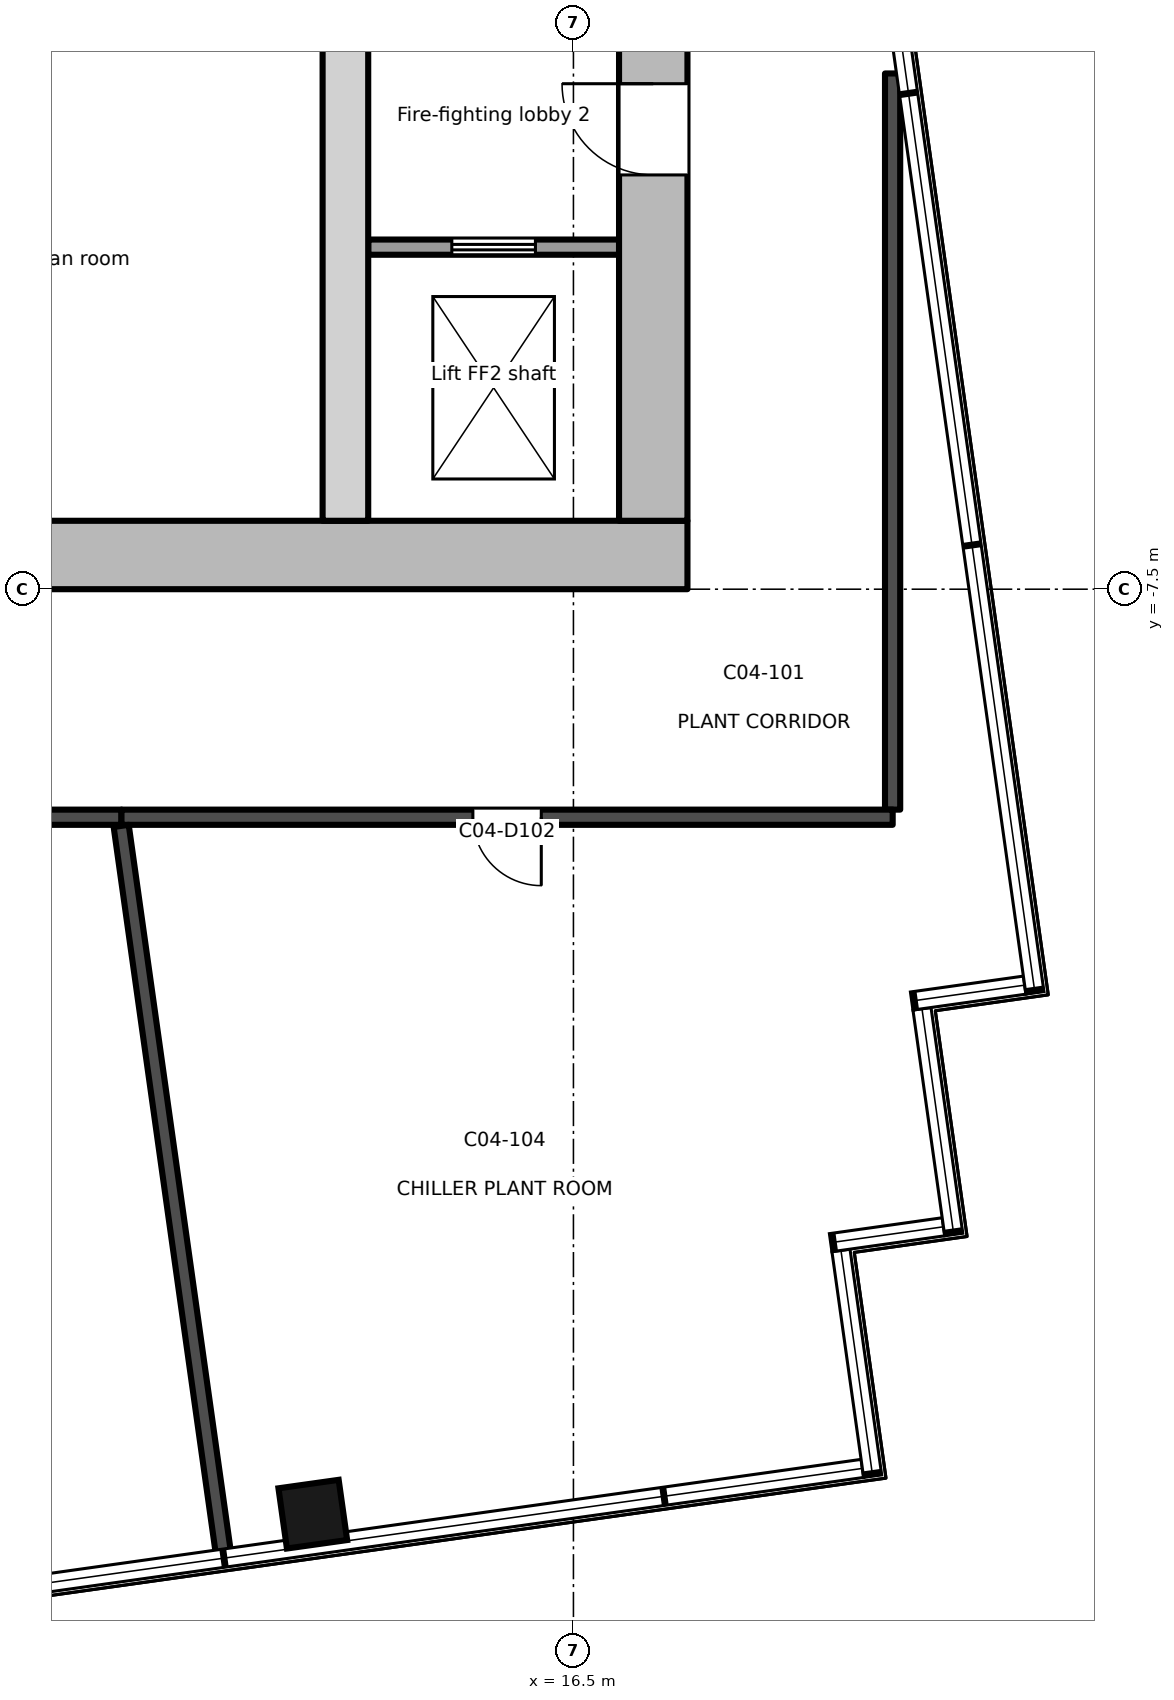
"""IFC4 building model, lengths in metres.
Left out: names, types, materials, properties, quantities, classifications, styles, units other than length and angle.
Written with IfcOpenShell. Run it as: python <this file> out.ifc"""

import sys

from ifc_helpers import new_model, si_unit, direction, frame, frame_2d, origin, origin_2d, place, context, subcontext, project, spatial, rectangle, extrude, element, fill, save


model = new_model("IFC4")
c1 = context("Model", 3, precision=1e-05, world=origin(), true_north=direction((0.0, 1.0)))
c2 = subcontext(c1, "Body", "Model", "MODEL_VIEW")
j1 = project(units=[si_unit("LENGTHUNIT", "METRE"), si_unit("PLANEANGLEUNIT", "RADIAN")], contexts=[c1])
p1 = place(None, origin())
s1 = spatial("IfcSite", under=j1, at=p1, CompositionType="ELEMENT")
p2 = place(p1, origin())
s2 = spatial("IfcBuilding", under=s1, at=p2, CompositionType="ELEMENT")
p3 = place(p2, frame((0.0, 0.0, 304.3)))
s3 = spatial("IfcBuildingStorey", under=s2, at=p3, CompositionType="ELEMENT", Elevation=304.3)
p4 = place(p3, frame((13.071, -19.669, -0.2), z_axis=(0.0, 0.0, 1.0), x_axis=(0.990265639562, 0.139190384377, 0.0)))
e1 = element("IfcColumn", 1, at=p4, inside=s3, PredefinedType="COLUMN", context=c2, shape_type="SweptSolid", body=[
    extrude(rectangle(XDim=0.8, YDim=0.8, at=origin_2d()), origin(), (0.0, 0.0, 1.0), 4.0),
])
p5 = place(p3, frame((-18.0, -7.05, -0.2), z_axis=(0.0, 0.0, 1.0), x_axis=(1.0, 0.0, 0.0)))
e2 = element("IfcWall", 2, at=p5, inside=s3, PredefinedType="SHEAR", context=c2, shape_type="SweptSolid", body=[
    extrude(rectangle(XDim=36.0, YDim=0.9, at=frame_2d((18.0, 0.0))), origin(), (0.0, 0.0, 1.0), 4.0),
])
p6 = place(p5, frame((4.9, 0.0, 0.2)))
e3 = element("IfcOpeningElement", 3, at=p6, cuts=e2, PredefinedType="OPENING", context=c2, shape_type="SweptSolid", body=[
    extrude(rectangle(XDim=1.8, YDim=2.1, at=frame_2d((0.9, 1.05))), frame((0.0, 0.46, 0.0), z_axis=(0.0, -1.0, 0.0), x_axis=(1.0, 0.0, 0.0)), (0.0, 0.0, 1.0), 0.921),
])
p7 = place(p5, frame((13.9, 0.0, 0.2)))
e4 = element("IfcOpeningElement", 4, at=p7, cuts=e2, PredefinedType="OPENING", context=c2, shape_type="SweptSolid", body=[
    extrude(rectangle(XDim=1.8, YDim=2.1, at=frame_2d((0.9, 1.05))), frame((0.0, 0.46, 0.0), z_axis=(0.0, -1.0, 0.0), x_axis=(1.0, 0.0, 0.0)), (0.0, 0.0, 1.0), 0.921),
])
p8 = place(p5, frame((22.9, 0.0, 0.2)))
e5 = element("IfcOpeningElement", 5, at=p8, cuts=e2, PredefinedType="OPENING", context=c2, shape_type="SweptSolid", body=[
    extrude(rectangle(XDim=1.8, YDim=2.1, at=frame_2d((0.9, 1.05))), frame((0.0, 0.46, 0.0), z_axis=(0.0, -1.0, 0.0), x_axis=(1.0, 0.0, 0.0)), (0.0, 0.0, 1.0), 0.921),
])
p9 = place(p3, frame((17.55, -6.6, -0.2), z_axis=(0.0, 0.0, 1.0), x_axis=(0.0, 1.0, 0.0)))
e6 = element("IfcWall", 6, at=p9, inside=s3, PredefinedType="SHEAR", context=c2, shape_type="SweptSolid", body=[
    extrude(rectangle(XDim=13.2, YDim=0.9, at=frame_2d((6.6, 0.0))), origin(), (0.0, 0.0, 1.0), 4.0),
])
p10 = place(p9, frame((4.55, 0.0, 0.2)))
e7 = element("IfcOpeningElement", 7, at=p10, cuts=e6, PredefinedType="OPENING", context=c2, shape_type="SweptSolid", body=[
    extrude(rectangle(XDim=1.2, YDim=2.1, at=frame_2d((0.6, 1.05))), frame((0.0, 0.46, 0.0), z_axis=(0.0, -1.0, 0.0), x_axis=(1.0, 0.0, 0.0)), (0.0, 0.0, 1.0), 0.921),
])
p11 = place(p3, frame((13.5, -6.6, -0.2), z_axis=(0.0, 0.0, 1.0), x_axis=(0.0, 1.0, 0.0)))
e8 = element("IfcWall", 8, at=p11, inside=s3, PredefinedType="SHEAR", context=c2, shape_type="SweptSolid", body=[
    extrude(rectangle(XDim=13.2, YDim=0.6, at=frame_2d((6.6, 0.0))), origin(), (0.0, 0.0, 1.0), 4.0),
])
p12 = place(p3, frame((13.8, -3.0, 0.0), z_axis=(0.0, 0.0, 1.0), x_axis=(1.0, 0.0, 0.0)))
e9 = element("IfcWall", 9, at=p12, inside=s3, PredefinedType="PARTITIONING", context=c2, shape_type="SweptSolid", body=[
    extrude(rectangle(XDim=3.3, YDim=0.2, at=frame_2d((1.65, 0.0))), origin(), (0.0, 0.0, 1.0), 3.8),
])
p13 = place(p12, frame((1.1, 0.0, 0.0)))
e10 = element("IfcOpeningElement", 10, at=p13, cuts=e9, PredefinedType="OPENING", context=c2, shape_type="SweptSolid", body=[
    extrude(rectangle(XDim=1.1, YDim=2.1, at=frame_2d((0.55, 1.05))), frame((0.0, 0.111, 0.0), z_axis=(0.0, -1.0, 0.0), x_axis=(1.0, 0.0, 0.0)), (0.0, 0.0, 1.0), 0.221),
])
p14 = place(p3, frame((10.554, -10.5, 0.0), z_axis=(0.0, 0.0, 1.0), x_axis=(-1.0, 0.0, 0.0)))
e11 = element("IfcWall", 11, at=p14, inside=s3, PredefinedType="PARTITIONING", context=c2, shape_type="SweptSolid", body=[
    extrude(rectangle(XDim=20.703, YDim=0.2, at=frame_2d((10.352, 0.0))), origin(), (0.0, 0.0, 1.0), 3.1),
])
p15 = place(p14, frame((9.902, 0.0, 0.0)))
e12 = element("IfcOpeningElement", 12, at=p15, cuts=e11, PredefinedType="OPENING", context=c2, shape_type="SweptSolid", body=[
    extrude(rectangle(XDim=0.9, YDim=2.1, at=frame_2d((0.45, 1.05))), frame((0.0, 0.111, 0.0), z_axis=(0.0, -1.0, 0.0), x_axis=(1.0, 0.0, 0.0)), (0.0, 0.0, 1.0), 0.221),
])
p16 = place(p3, frame((20.699, -0.715, 0.0), z_axis=(0.0, 0.0, 1.0), x_axis=(0.0, -1.0, 0.0)))
e13 = element("IfcWall", 13, at=p16, inside=s3, PredefinedType="PARTITIONING", context=c2, shape_type="SweptSolid", body=[
    extrude(rectangle(XDim=9.685, YDim=0.2, at=frame_2d((4.842, 0.0))), origin(), (0.0, 0.0, 1.0), 3.8),
])
p17 = place(p3, frame((20.7, -10.5, 0.0), z_axis=(0.0, 0.0, 1.0), x_axis=(-1.0, 0.0, 0.0)))
e14 = element("IfcWall", 14, at=p17, inside=s3, PredefinedType="PARTITIONING", context=c2, shape_type="SweptSolid", body=[
    extrude(rectangle(XDim=10.146, YDim=0.2, at=frame_2d((5.073, 0.0))), origin(), (0.0, 0.0, 1.0), 3.2),
])
p18 = place(p17, frame((4.623, 0.0, 0.0)))
e15 = element("IfcOpeningElement", 15, at=p18, cuts=e14, PredefinedType="OPENING", context=c2, shape_type="SweptSolid", body=[
    extrude(rectangle(XDim=0.9, YDim=2.1, at=frame_2d((0.45, 1.05))), frame((0.0, 0.111, 0.0), z_axis=(0.0, -1.0, 0.0), x_axis=(1.0, 0.0, 0.0)), (0.0, 0.0, 1.0), 0.221),
])
p19 = place(p3, frame((10.55, -10.614, 0.0), z_axis=(0.0, 0.0, 1.0), x_axis=(0.139161669219, -0.990269675301, 0.0)))
e16 = element("IfcWall", 16, at=p19, inside=s3, PredefinedType="PARTITIONING", context=c2, shape_type="SweptSolid", body=[
    extrude(rectangle(XDim=9.637, YDim=0.2, at=frame_2d((4.818, 0.0))), origin(), (0.0, 0.0, 1.0), 3.8),
])
p20 = place(p13, origin())
e17 = element("IfcDoor", 17, at=p20, inside=s3, OperationType="DOUBLE_DOOR_SLIDING", PredefinedType="DOOR", context=c2, shape_type="SweptSolid", body=[
    extrude(rectangle(XDim=1.1, YDim=2.1, at=frame_2d((0.55, 1.05))), frame((0.0, 0.025, 0.0), z_axis=(0.0, -1.0, 0.0), x_axis=(1.0, 0.0, 0.0)), (0.0, 0.0, 1.0), 0.05),
])
fill(e10, e17)
p21 = place(p10, origin())
e18 = element("IfcDoor", 18, at=p21, inside=s3, OperationType="SINGLE_SWING_RIGHT", PredefinedType="DOOR", context=c2, shape_type="SweptSolid", body=[
    extrude(rectangle(XDim=1.2, YDim=2.1, at=frame_2d((0.6, 1.05))), frame((0.0, 0.025, 0.0), z_axis=(0.0, -1.0, 0.0), x_axis=(1.0, 0.0, 0.0)), (0.0, 0.0, 1.0), 0.05),
])
fill(e7, e18)
p22 = place(p18, origin())
e19 = element("IfcDoor", 19, at=p22, inside=s3, OperationType="SINGLE_SWING_LEFT", PredefinedType="DOOR", context=c2, shape_type="SweptSolid", body=[
    extrude(rectangle(XDim=0.9, YDim=2.1, at=frame_2d((0.45, 1.05))), frame((0.0, 0.025, 0.0), z_axis=(0.0, -1.0, 0.0), x_axis=(1.0, 0.0, 0.0)), (0.0, 0.0, 1.0), 0.05),
])
fill(e15, e19)
save(model, sys.argv[1])
